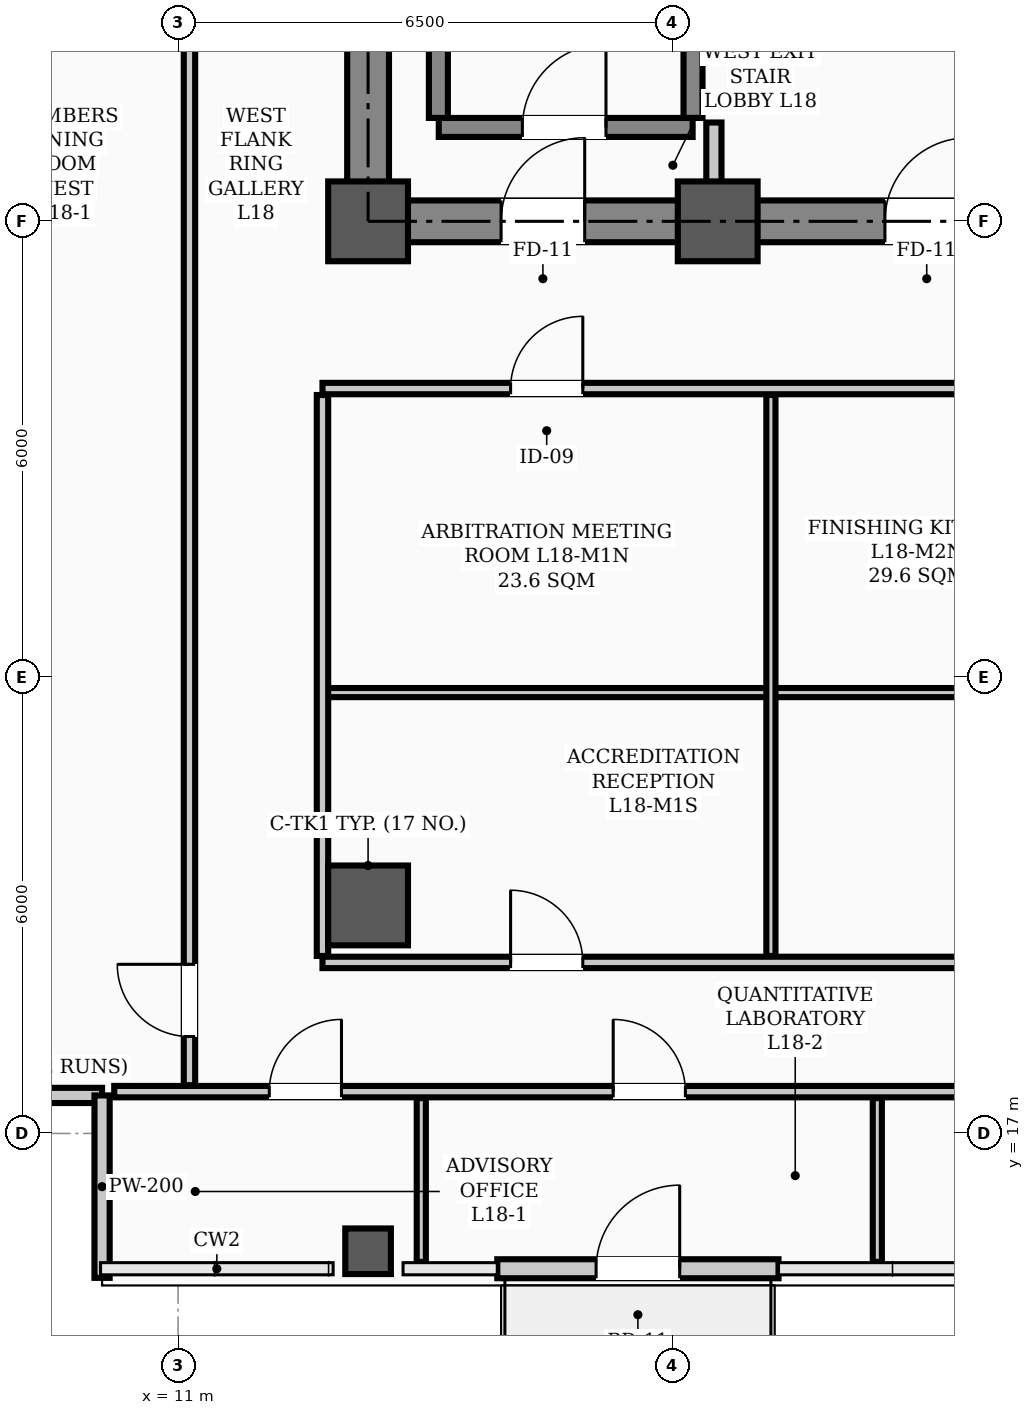
"""IFC4 building model, lengths in metres.
Left out: names, types, materials, properties, quantities, classifications, styles, units other than length and angle.
Written with IfcOpenShell. Run it as: python <this file> out.ifc"""

import sys

from ifc_helpers import new_model, si_unit, direction, frame, frame_2d, origin, origin_2d, place, context, subcontext, project, spatial, rectangle, hollow_rectangle, extrude, element, fill, save


model = new_model("IFC4")
c1 = context("Model", 3, precision=1e-05, world=origin(), true_north=direction((0.0, 1.0)))
c2 = subcontext(c1, "Body", "Model", "MODEL_VIEW")
j1 = project(units=[si_unit("LENGTHUNIT", "METRE"), si_unit("PLANEANGLEUNIT", "RADIAN")], contexts=[c1])
p1 = place(None, origin())
s1 = spatial("IfcSite", under=j1, at=p1, CompositionType="ELEMENT")
p2 = place(p1, origin())
s2 = spatial("IfcBuilding", under=s1, at=p2, CompositionType="ELEMENT")
p3 = place(p2, frame((0.0, 0.0, 73.3)))
s3 = spatial("IfcBuildingStorey", under=s2, at=p3, CompositionType="ELEMENT", Elevation=73.3)
for number, where, z_axis, x_axis in (
    (1, (13.5, 29.0, 0.0), (0.0, 0.0, 1.0), (1.0, 0.0, 0.0)),
    (2, (18.1, 29.0, 0.0), (0.0, 0.0, 1.0), (1.0, 0.0, 0.0)),
    (3, (13.5, 20.0, 0.0), (0.0, 0.0, 1.0), (1.0, 0.0, 0.0)),
):
    element("IfcColumn", number, at=place(p3, frame(where, z_axis=z_axis, x_axis=x_axis)), inside=s3, PredefinedType="COLUMN", context=c2, shape_type="SweptSolid", body=[
        extrude(hollow_rectangle(XDim=1.05, YDim=1.05, WallThickness=0.038, InnerFilletRadius=0.019, OuterFilletRadius=0.057, at=origin_2d()), origin(), (0.0, 0.0, 1.0), 3.9),
    ])
p4 = place(p3, frame((13.5, 15.45, 0.0), z_axis=(0.0, 0.0, 1.0), x_axis=(1.0, 0.0, 0.0)))
e4 = element("IfcColumn", 4, at=p4, inside=s3, PredefinedType="COLUMN", context=c2, shape_type="SweptSolid", body=[
    extrude(hollow_rectangle(XDim=0.6, YDim=0.6, WallThickness=0.026, InnerFilletRadius=0.013, OuterFilletRadius=0.039, at=origin_2d()), origin(), (0.0, 0.0, 1.0), 3.9),
])
for number, where, z_axis, x_axis in (
    (5, (7.6, 17.5, 0.0), (0.0, 0.0, 1.0), (1.0, 0.0, 0.0)),
    (6, (10.0, 17.5, 0.0), (0.0, 0.0, 1.0), (0.0, -1.0, 0.0)),
):
    element("IfcWall", number, at=place(p3, frame(where, z_axis=z_axis, x_axis=x_axis)), inside=s3, PredefinedType="PARAPET", context=c2, shape_type="SweptSolid", body=[
        extrude(rectangle(XDim=2.4, YDim=0.2, at=frame_2d((1.2, 0.0))), origin(), (0.0, 0.0, 1.0), 1.2),
    ])
p5 = place(p3, frame((15.2, 15.22, 0.0), z_axis=(0.0, 0.0, 1.0), x_axis=(1.0, 0.0, 0.0)))
e7 = element("IfcWall", 7, at=p5, inside=s3, PredefinedType="STANDARD", context=c2, shape_type="SweptSolid", body=[
    extrude(rectangle(XDim=3.7, YDim=0.25, at=frame_2d((1.85, 0.0))), origin(), (0.0, 0.0, 1.0), 3.18),
])
p6 = place(p5, frame((1.3, 0.0, 0.0)))
e8 = element("IfcOpeningElement", 8, at=p6, cuts=e7, PredefinedType="OPENING", context=c2, shape_type="SweptSolid", body=[
    extrude(rectangle(XDim=1.1, YDim=2.2, at=frame_2d((0.55, 1.1))), frame((0.0, 0.135, 0.0), z_axis=(0.0, -1.0, 0.0), x_axis=(1.0, 0.0, 0.0)), (0.0, 0.0, 1.0), 0.27),
])
p7 = place(p3, frame((13.5, 29.0, 0.0), z_axis=(0.0, 0.0, 1.0), x_axis=(1.0, 0.0, 0.0)))
e9 = element("IfcWall", 9, at=p7, inside=s3, PredefinedType="SHEAR", context=c2, shape_type="SweptSolid", body=[
    extrude(rectangle(XDim=30.5, YDim=0.55, at=frame_2d((15.25, 0.0))), origin(), (0.0, 0.0, 1.0), 3.72),
])
p8 = place(p7, frame((1.75, 0.0, 0.0)))
e10 = element("IfcOpeningElement", 10, at=p8, cuts=e9, PredefinedType="OPENING", context=c2, shape_type="SweptSolid", body=[
    extrude(rectangle(XDim=1.1, YDim=2.08, at=frame_2d((0.55, 1.04))), frame((0.0, 0.285, 0.0), z_axis=(0.0, -1.0, 0.0), x_axis=(1.0, 0.0, 0.0)), (0.0, 0.0, 1.0), 0.57),
])
p9 = place(p7, frame((26.7, 0.0, 0.0)))
e11 = element("IfcOpeningElement", 11, at=p9, cuts=e9, PredefinedType="OPENING", context=c2, shape_type="SweptSolid", body=[
    extrude(rectangle(XDim=1.1, YDim=2.08, at=frame_2d((0.55, 1.04))), frame((0.0, 0.285, 0.0), z_axis=(0.0, -1.0, 0.0), x_axis=(1.0, 0.0, 0.0)), (0.0, 0.0, 1.0), 0.57),
])
p10 = place(p7, frame((6.8, 0.0, 0.0)))
e12 = element("IfcOpeningElement", 12, at=p10, cuts=e9, PredefinedType="OPENING", context=c2, shape_type="SweptSolid", body=[
    extrude(rectangle(XDim=1.1, YDim=2.08, at=frame_2d((0.55, 1.04))), frame((0.0, 0.285, 0.0), z_axis=(0.0, -1.0, 0.0), x_axis=(1.0, 0.0, 0.0)), (0.0, 0.0, 1.0), 0.57),
])
p11 = place(p7, frame((13.2, 0.0, 0.0)))
e13 = element("IfcOpeningElement", 13, at=p11, cuts=e9, PredefinedType="OPENING", context=c2, shape_type="SweptSolid", body=[
    extrude(rectangle(XDim=1.6, YDim=2.08, at=frame_2d((0.8, 1.04))), frame((0.0, 0.285, 0.0), z_axis=(0.0, -1.0, 0.0), x_axis=(1.0, 0.0, 0.0)), (0.0, 0.0, 1.0), 0.57),
])
p12 = place(p7, frame((20.525, 0.0, 0.0)))
e14 = element("IfcOpeningElement", 14, at=p12, cuts=e9, PredefinedType="OPENING", context=c2, shape_type="SweptSolid", body=[
    extrude(rectangle(XDim=0.95, YDim=2.08, at=frame_2d((0.475, 1.04))), frame((0.0, 0.285, 0.0), z_axis=(0.0, -1.0, 0.0), x_axis=(1.0, 0.0, 0.0)), (0.0, 0.0, 1.0), 0.57),
])
p13 = place(p3, frame((13.5, 29.35, 0.0), z_axis=(0.0, 0.0, 1.0), x_axis=(0.0, 1.0, 0.0)))
e15 = element("IfcWall", 15, at=p13, inside=s3, PredefinedType="SHEAR", context=c2, shape_type="SweptSolid", body=[
    extrude(rectangle(XDim=8.6, YDim=0.55, at=frame_2d((4.3, 0.0))), origin(), (0.0, 0.0, 1.0), 3.72),
])
p14 = place(p3, frame((14.43, 30.235, 0.0), z_axis=(0.0, 0.0, 1.0), x_axis=(1.0, 0.0, 0.0)))
e16 = element("IfcWall", 16, at=p14, inside=s3, PredefinedType="STANDARD", context=c2, shape_type="SweptSolid", body=[
    extrude(rectangle(XDim=3.34, YDim=0.25, at=frame_2d((1.67, 0.0))), origin(), (0.0, 0.0, 1.0), 3.72),
])
p15 = place(p14, frame((1.1, 0.0, 0.0)))
e17 = element("IfcOpeningElement", 17, at=p15, cuts=e16, PredefinedType="OPENING", context=c2, shape_type="SweptSolid", body=[
    extrude(rectangle(XDim=1.1, YDim=2.08, at=frame_2d((0.55, 1.04))), frame((0.0, 0.135, 0.0), z_axis=(0.0, -1.0, 0.0), x_axis=(1.0, 0.0, 0.0)), (0.0, 0.0, 1.0), 0.27),
])
for number, where, z_axis, x_axis in (
    (18, (14.425, 30.36, 0.0), (0.0, 0.0, 1.0), (0.0, 1.0, 0.0)),
    (19, (17.775, 30.36, 0.0), (0.0, 0.0, 1.0), (0.0, 1.0, 0.0)),
):
    element("IfcWall", number, at=place(p3, frame(where, z_axis=z_axis, x_axis=x_axis)), inside=s3, PredefinedType="STANDARD", context=c2, shape_type="SweptSolid", body=[
        extrude(rectangle(XDim=7.184, YDim=0.25, at=frame_2d((3.592, 0.0))), origin(), (0.0, 0.0, 1.0), 3.72),
    ])
p16 = place(p3, frame((12.9, 26.8, 0.0), z_axis=(0.0, 0.0, 1.0), x_axis=(1.0, 0.0, 0.0)))
e20 = element("IfcWall", 20, at=p16, inside=s3, PredefinedType="PARTITIONING", context=c2, shape_type="SweptSolid", body=[
    extrude(rectangle(XDim=31.7, YDim=0.15, at=frame_2d((15.85, 0.0))), origin(), (0.0, 0.0, 1.0), 3.1),
])
p17 = place(p16, frame((13.6, 0.0, 0.0)))
e21 = element("IfcOpeningElement", 21, at=p17, cuts=e20, PredefinedType="OPENING", context=c2, shape_type="SweptSolid", body=[
    extrude(rectangle(XDim=1.6, YDim=2.08, at=frame_2d((0.8, 1.04))), frame((0.0, 0.085, 0.0), z_axis=(0.0, -1.0, 0.0), x_axis=(1.0, 0.0, 0.0)), (0.0, 0.0, 1.0), 0.17),
])
p18 = place(p16, frame((2.475, 0.0, 0.0)))
e22 = element("IfcOpeningElement", 22, at=p18, cuts=e20, PredefinedType="OPENING", context=c2, shape_type="SweptSolid", body=[
    extrude(rectangle(XDim=0.95, YDim=2.08, at=frame_2d((0.475, 1.04))), frame((0.0, 0.085, 0.0), z_axis=(0.0, -1.0, 0.0), x_axis=(1.0, 0.0, 0.0)), (0.0, 0.0, 1.0), 0.17),
])
p19 = place(p16, frame((9.125, 0.0, 0.0)))
e23 = element("IfcOpeningElement", 23, at=p19, cuts=e20, PredefinedType="OPENING", context=c2, shape_type="SweptSolid", body=[
    extrude(rectangle(XDim=0.95, YDim=2.08, at=frame_2d((0.475, 1.04))), frame((0.0, 0.085, 0.0), z_axis=(0.0, -1.0, 0.0), x_axis=(1.0, 0.0, 0.0)), (0.0, 0.0, 1.0), 0.17),
])
p20 = place(p16, frame((19.125, 0.0, 0.0)))
e24 = element("IfcOpeningElement", 24, at=p20, cuts=e20, PredefinedType="OPENING", context=c2, shape_type="SweptSolid", body=[
    extrude(rectangle(XDim=0.95, YDim=2.08, at=frame_2d((0.475, 1.04))), frame((0.0, 0.085, 0.0), z_axis=(0.0, -1.0, 0.0), x_axis=(1.0, 0.0, 0.0)), (0.0, 0.0, 1.0), 0.17),
])
p21 = place(p16, frame((26.325, 0.0, 0.0)))
e25 = element("IfcOpeningElement", 25, at=p21, cuts=e20, PredefinedType="OPENING", context=c2, shape_type="SweptSolid", body=[
    extrude(rectangle(XDim=0.95, YDim=2.08, at=frame_2d((0.475, 1.04))), frame((0.0, 0.085, 0.0), z_axis=(0.0, -1.0, 0.0), x_axis=(1.0, 0.0, 0.0)), (0.0, 0.0, 1.0), 0.17),
])
p22 = place(p3, frame((10.16, 17.55, 0.0), z_axis=(0.0, 0.0, 1.0), x_axis=(1.0, 0.0, 0.0)))
e26 = element("IfcWall", 26, at=p22, inside=s3, PredefinedType="PARTITIONING", context=c2, shape_type="SweptSolid", body=[
    extrude(rectangle(XDim=44.68, YDim=0.15, at=frame_2d((22.34, 0.0))), origin(), (0.0, 0.0, 1.0), 3.1),
])
p23 = place(p22, frame((2.04, 0.0, 0.0)))
e27 = element("IfcOpeningElement", 27, at=p23, cuts=e26, PredefinedType="OPENING", context=c2, shape_type="SweptSolid", body=[
    extrude(rectangle(XDim=0.95, YDim=2.08, at=frame_2d((0.475, 1.04))), frame((0.0, 0.085, 0.0), z_axis=(0.0, -1.0, 0.0), x_axis=(1.0, 0.0, 0.0)), (0.0, 0.0, 1.0), 0.17),
])
p24 = place(p22, frame((6.565, 0.0, 0.0)))
e28 = element("IfcOpeningElement", 28, at=p24, cuts=e26, PredefinedType="OPENING", context=c2, shape_type="SweptSolid", body=[
    extrude(rectangle(XDim=0.95, YDim=2.08, at=frame_2d((0.475, 1.04))), frame((0.0, 0.085, 0.0), z_axis=(0.0, -1.0, 0.0), x_axis=(1.0, 0.0, 0.0)), (0.0, 0.0, 1.0), 0.17),
])
p25 = place(p22, frame((11.865, 0.0, 0.0)))
e29 = element("IfcOpeningElement", 29, at=p25, cuts=e26, PredefinedType="OPENING", context=c2, shape_type="SweptSolid", body=[
    extrude(rectangle(XDim=0.95, YDim=2.08, at=frame_2d((0.475, 1.04))), frame((0.0, 0.085, 0.0), z_axis=(0.0, -1.0, 0.0), x_axis=(1.0, 0.0, 0.0)), (0.0, 0.0, 1.0), 0.17),
])
p26 = place(p22, frame((24.665, 0.0, 0.0)))
e30 = element("IfcOpeningElement", 30, at=p26, cuts=e26, PredefinedType="OPENING", context=c2, shape_type="SweptSolid", body=[
    extrude(rectangle(XDim=0.95, YDim=2.08, at=frame_2d((0.475, 1.04))), frame((0.0, 0.085, 0.0), z_axis=(0.0, -1.0, 0.0), x_axis=(1.0, 0.0, 0.0)), (0.0, 0.0, 1.0), 0.17),
])
p27 = place(p22, frame((31.765, 0.0, 0.0)))
e31 = element("IfcOpeningElement", 31, at=p27, cuts=e26, PredefinedType="OPENING", context=c2, shape_type="SweptSolid", body=[
    extrude(rectangle(XDim=0.95, YDim=2.08, at=frame_2d((0.475, 1.04))), frame((0.0, 0.085, 0.0), z_axis=(0.0, -1.0, 0.0), x_axis=(1.0, 0.0, 0.0)), (0.0, 0.0, 1.0), 0.17),
])
p28 = place(p3, frame((12.9, 19.25, 0.0), z_axis=(0.0, 0.0, 1.0), x_axis=(1.0, 0.0, 0.0)))
e32 = element("IfcWall", 32, at=p28, inside=s3, PredefinedType="PARTITIONING", context=c2, shape_type="SweptSolid", body=[
    extrude(rectangle(XDim=13.3, YDim=0.15, at=frame_2d((6.65, 0.0))), origin(), (0.0, 0.0, 1.0), 3.1),
])
p29 = place(p28, frame((2.475, 0.0, 0.0)))
e33 = element("IfcOpeningElement", 33, at=p29, cuts=e32, PredefinedType="OPENING", context=c2, shape_type="SweptSolid", body=[
    extrude(rectangle(XDim=0.95, YDim=2.08, at=frame_2d((0.475, 1.04))), frame((0.0, 0.085, 0.0), z_axis=(0.0, -1.0, 0.0), x_axis=(1.0, 0.0, 0.0)), (0.0, 0.0, 1.0), 0.17),
])
p30 = place(p28, frame((9.125, 0.0, 0.0)))
e34 = element("IfcOpeningElement", 34, at=p30, cuts=e32, PredefinedType="OPENING", context=c2, shape_type="SweptSolid", body=[
    extrude(rectangle(XDim=0.95, YDim=2.08, at=frame_2d((0.475, 1.04))), frame((0.0, 0.085, 0.0), z_axis=(0.0, -1.0, 0.0), x_axis=(1.0, 0.0, 0.0)), (0.0, 0.0, 1.0), 0.17),
])
p31 = place(p3, frame((12.9, 22.8, 0.0), z_axis=(0.0, 0.0, 1.0), x_axis=(1.0, 0.0, 0.0)))
e35 = element("IfcWall", 35, at=p31, inside=s3, PredefinedType="PARTITIONING", context=c2, shape_type="SweptSolid", body=[
    extrude(rectangle(XDim=5.9, YDim=0.12, at=frame_2d((2.95, 0.0))), origin(), (0.0, 0.0, 1.0), 3.1),
])
p32 = place(p3, frame((18.8, 22.8, 0.0), z_axis=(0.0, 0.0, 1.0), x_axis=(1.0, 0.0, 0.0)))
e36 = element("IfcWall", 36, at=p32, inside=s3, PredefinedType="PARTITIONING", context=c2, shape_type="SweptSolid", body=[
    extrude(rectangle(XDim=7.4, YDim=0.12, at=frame_2d((3.7, 0.0))), origin(), (0.0, 0.0, 1.0), 3.1),
])
p33 = place(p3, frame((18.05, 29.285, 0.0), z_axis=(0.0, 0.0, 1.0), x_axis=(0.0, 1.0, 0.0)))
e37 = element("IfcWall", 37, at=p33, inside=s3, PredefinedType="STANDARD", context=c2, shape_type="SweptSolid", body=[
    extrude(rectangle(XDim=1.015, YDim=0.2, at=frame_2d((0.508, 0.0))), origin(), (0.0, 0.0, 1.0), 3.3),
])
p34 = place(p3, frame((11.15, 17.635, 0.0), z_axis=(0.0, 0.0, 1.0), x_axis=(0.0, 1.0, 0.0)))
e38 = element("IfcWall", 38, at=p34, inside=s3, PredefinedType="PARTITIONING", context=c2, shape_type="SweptSolid", body=[
    extrude(rectangle(XDim=22.53, YDim=0.15, at=frame_2d((11.265, 0.0))), origin(), (0.0, 0.0, 1.0), 3.0),
])
p35 = place(p34, frame((0.64, 0.0, 0.0)))
e39 = element("IfcOpeningElement", 39, at=p35, cuts=e38, PredefinedType="OPENING", context=c2, shape_type="SweptSolid", body=[
    extrude(rectangle(XDim=0.95, YDim=2.08, at=frame_2d((0.475, 1.04))), frame((0.0, 0.085, 0.0), z_axis=(0.0, -1.0, 0.0), x_axis=(1.0, 0.0, 0.0)), (0.0, 0.0, 1.0), 0.17),
])
p36 = place(p3, frame((12.9, 19.335, 0.0), z_axis=(0.0, 0.0, 1.0), x_axis=(0.0, 1.0, 0.0)))
e40 = element("IfcWall", 40, at=p36, inside=s3, PredefinedType="PARTITIONING", context=c2, shape_type="SweptSolid", body=[
    extrude(rectangle(XDim=7.38, YDim=0.15, at=frame_2d((3.69, 0.0))), origin(), (0.0, 0.0, 1.0), 3.0),
])
for number, where, z_axis, x_axis in (
    (41, (14.2, 15.31, 0.0), (0.0, 0.0, 1.0), (0.0, 1.0, 0.0)),
    (42, (20.2, 15.31, 0.0), (0.0, 0.0, 1.0), (0.0, 1.0, 0.0)),
):
    element("IfcWall", number, at=place(p3, frame(where, z_axis=z_axis, x_axis=x_axis)), inside=s3, PredefinedType="PARTITIONING", context=c2, shape_type="SweptSolid", body=[
        extrude(rectangle(XDim=2.155, YDim=0.12, at=frame_2d((1.078, 0.0))), origin(), (0.0, 0.0, 1.0), 3.212),
    ])
p37 = place(p3, frame((18.8, 19.335, 0.0), z_axis=(0.0, 0.0, 1.0), x_axis=(0.0, 1.0, 0.0)))
e43 = element("IfcWall", 43, at=p37, inside=s3, PredefinedType="PARTITIONING", context=c2, shape_type="SweptSolid", body=[
    extrude(rectangle(XDim=7.38, YDim=0.12, at=frame_2d((3.69, 0.0))), origin(), (0.0, 0.0, 1.0), 3.0),
])
p38 = place(p6, origin())
e44 = element("IfcDoor", 44, at=p38, inside=s3, OperationType="SINGLE_SWING_RIGHT", PredefinedType="DOOR", context=c2, shape_type="SweptSolid", body=[
    extrude(rectangle(XDim=1.1, YDim=2.2, at=frame_2d((0.55, 1.1))), frame((0.0, 0.025, 0.0), z_axis=(0.0, -1.0, 0.0), x_axis=(1.0, 0.0, 0.0)), (0.0, 0.0, 1.0), 0.05),
])
fill(e8, e44)
p39 = place(p15, origin())
e45 = element("IfcDoor", 45, at=p39, inside=s3, OperationType="SINGLE_SWING_RIGHT", PredefinedType="DOOR", context=c2, shape_type="SweptSolid", body=[
    extrude(rectangle(XDim=1.1, YDim=2.08, at=frame_2d((0.55, 1.04))), frame((0.0, 0.025, 0.0), z_axis=(0.0, -1.0, 0.0), x_axis=(1.0, 0.0, 0.0)), (0.0, 0.0, 1.0), 0.05),
])
fill(e17, e45)
p40 = place(p8, origin())
e46 = element("IfcDoor", 46, at=p40, inside=s3, OperationType="SINGLE_SWING_RIGHT", PredefinedType="DOOR", context=c2, shape_type="SweptSolid", body=[
    extrude(rectangle(XDim=1.1, YDim=2.08, at=frame_2d((0.55, 1.04))), frame((0.0, 0.025, 0.0), z_axis=(0.0, -1.0, 0.0), x_axis=(1.0, 0.0, 0.0)), (0.0, 0.0, 1.0), 0.05),
])
fill(e10, e46)
p41 = place(p10, origin())
e47 = element("IfcDoor", 47, at=p41, inside=s3, OperationType="SINGLE_SWING_RIGHT", PredefinedType="DOOR", context=c2, shape_type="SweptSolid", body=[
    extrude(rectangle(XDim=1.1, YDim=2.08, at=frame_2d((0.55, 1.04))), frame((0.0, 0.025, 0.0), z_axis=(0.0, -1.0, 0.0), x_axis=(1.0, 0.0, 0.0)), (0.0, 0.0, 1.0), 0.05),
])
fill(e12, e47)
p42 = place(p23, origin())
e48 = element("IfcDoor", 48, at=p42, inside=s3, OperationType="SINGLE_SWING_RIGHT", PredefinedType="DOOR", context=c2, shape_type="SweptSolid", body=[
    extrude(rectangle(XDim=0.95, YDim=2.08, at=frame_2d((0.475, 1.04))), frame((0.0, 0.025, 0.0), z_axis=(0.0, -1.0, 0.0), x_axis=(1.0, 0.0, 0.0)), (0.0, 0.0, 1.0), 0.05),
])
fill(e27, e48)
p43 = place(p24, origin())
e49 = element("IfcDoor", 49, at=p43, inside=s3, OperationType="SINGLE_SWING_LEFT", PredefinedType="DOOR", context=c2, shape_type="SweptSolid", body=[
    extrude(rectangle(XDim=0.95, YDim=2.08, at=frame_2d((0.475, 1.04))), frame((0.0, 0.025, 0.0), z_axis=(0.0, -1.0, 0.0), x_axis=(1.0, 0.0, 0.0)), (0.0, 0.0, 1.0), 0.05),
])
fill(e28, e49)
p44 = place(p18, origin())
e50 = element("IfcDoor", 50, at=p44, inside=s3, OperationType="SINGLE_SWING_RIGHT", PredefinedType="DOOR", context=c2, shape_type="SweptSolid", body=[
    extrude(rectangle(XDim=0.95, YDim=2.08, at=frame_2d((0.475, 1.04))), frame((0.0, 0.025, 0.0), z_axis=(0.0, -1.0, 0.0), x_axis=(1.0, 0.0, 0.0)), (0.0, 0.0, 1.0), 0.05),
])
fill(e22, e50)
p45 = place(p29, origin())
e51 = element("IfcDoor", 51, at=p45, inside=s3, OperationType="SINGLE_SWING_LEFT", PredefinedType="DOOR", context=c2, shape_type="SweptSolid", body=[
    extrude(rectangle(XDim=0.95, YDim=2.08, at=frame_2d((0.475, 1.04))), frame((0.0, 0.025, 0.0), z_axis=(0.0, -1.0, 0.0), x_axis=(1.0, 0.0, 0.0)), (0.0, 0.0, 1.0), 0.05),
])
fill(e33, e51)
p46 = place(p35, origin())
e52 = element("IfcDoor", 52, at=p46, inside=s3, OperationType="SINGLE_SWING_RIGHT", PredefinedType="DOOR", context=c2, shape_type="SweptSolid", body=[
    extrude(rectangle(XDim=0.95, YDim=2.08, at=frame_2d((0.475, 1.04))), frame((0.0, 0.025, 0.0), z_axis=(0.0, -1.0, 0.0), x_axis=(1.0, 0.0, 0.0)), (0.0, 0.0, 1.0), 0.05),
])
fill(e39, e52)
save(model, sys.argv[1])
